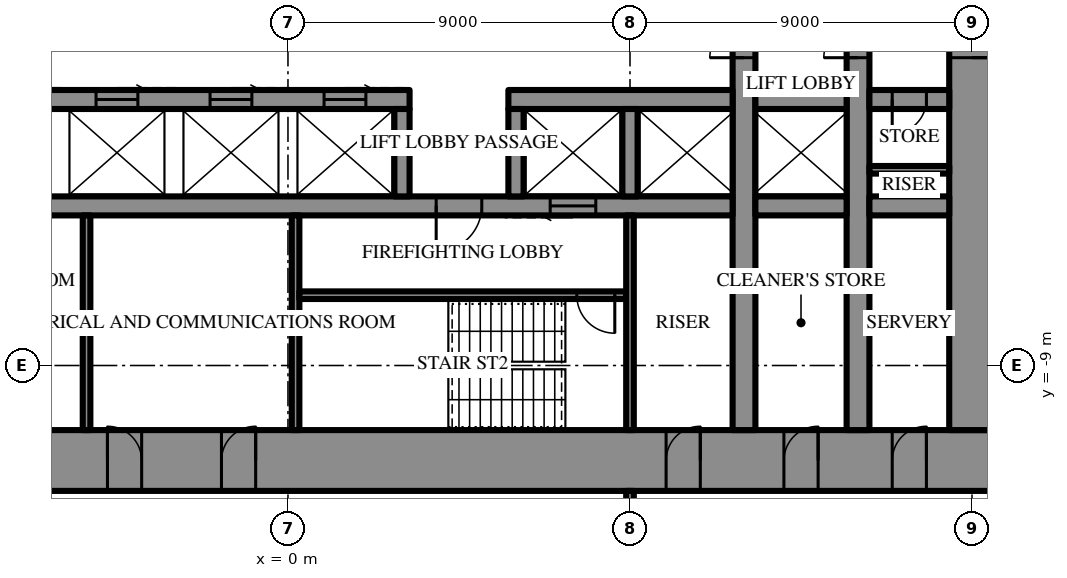
"""IFC4 building model, lengths in metres.
Left out: names, types, materials, properties, quantities, classifications, styles, units other than length and angle.
Written with IfcOpenShell. Run it as: python <this file> out.ifc"""

import sys

from ifc_helpers import new_model, si_unit, direction, frame, frame_2d, origin, place, context, subcontext, project, spatial, rectangle, extrude, element, fill, save


model = new_model("IFC4")
c1 = context("Model", 3, precision=1e-05, world=origin(), true_north=direction((0.0, 1.0)))
c2 = subcontext(c1, "Body", "Model", "MODEL_VIEW")
j1 = project(units=[si_unit("LENGTHUNIT", "METRE"), si_unit("PLANEANGLEUNIT", "RADIAN")], contexts=[c1])
p1 = place(None, origin())
s1 = spatial("IfcSite", under=j1, at=p1, CompositionType="ELEMENT")
p2 = place(p1, origin())
s2 = spatial("IfcBuilding", under=s1, at=p2, CompositionType="ELEMENT")
p3 = place(p2, frame((0.0, 0.0, 165.7)))
s3 = spatial("IfcBuildingStorey", under=s2, at=p3, CompositionType="ELEMENT", Elevation=165.7)
p4 = place(p3, frame((18.6, -11.5, 0.0), z_axis=(0.0, 0.0, 1.0), x_axis=(-1.0, 0.0, 0.0)))
e1 = element("IfcWall", 1, at=p4, inside=s3, PredefinedType="SHEAR", context=c2, shape_type="SweptSolid", body=[
    extrude(rectangle(XDim=37.2, YDim=1.6, at=frame_2d((18.6, 0.0))), origin(), (0.0, 0.0, 1.0), 4.2),
])
p5 = place(p4, frame((19.45, 0.0, 0.0)))
e2 = element("IfcOpeningElement", 2, at=p5, cuts=e1, PredefinedType="OPENING", context=c2, shape_type="SweptSolid", body=[
    extrude(rectangle(XDim=0.9, YDim=2.2, at=frame_2d((0.45, 1.1))), frame((0.0, 0.81, 0.0), z_axis=(0.0, -1.0, 0.0), x_axis=(1.0, 0.0, 0.0)), (0.0, 0.0, 1.0), 1.62),
])
p6 = place(p4, frame((22.45, 0.0, 0.0)))
e3 = element("IfcOpeningElement", 3, at=p6, cuts=e1, PredefinedType="OPENING", context=c2, shape_type="SweptSolid", body=[
    extrude(rectangle(XDim=0.9, YDim=2.2, at=frame_2d((0.45, 1.1))), frame((0.0, 0.81, 0.0), z_axis=(0.0, -1.0, 0.0), x_axis=(1.0, 0.0, 0.0)), (0.0, 0.0, 1.0), 1.62),
])
p7 = place(p4, frame((25.5, 0.0, 0.0)))
e4 = element("IfcOpeningElement", 4, at=p7, cuts=e1, PredefinedType="OPENING", context=c2, shape_type="SweptSolid", body=[
    extrude(rectangle(XDim=1.0, YDim=2.2, at=frame_2d((0.5, 1.1))), frame((0.0, 0.81, 0.0), z_axis=(0.0, -1.0, 0.0), x_axis=(1.0, 0.0, 0.0)), (0.0, 0.0, 1.0), 1.62),
])
p8 = place(p4, frame((1.8, 0.0, 0.0)))
e5 = element("IfcOpeningElement", 5, at=p8, cuts=e1, PredefinedType="OPENING", context=c2, shape_type="SweptSolid", body=[
    extrude(rectangle(XDim=0.9, YDim=2.2, at=frame_2d((0.45, 1.1))), frame((0.0, 0.81, 0.0), z_axis=(0.0, -1.0, 0.0), x_axis=(1.0, 0.0, 0.0)), (0.0, 0.0, 1.0), 1.62),
])
p9 = place(p4, frame((4.65, 0.0, 0.0)))
e6 = element("IfcOpeningElement", 6, at=p9, cuts=e1, PredefinedType="OPENING", context=c2, shape_type="SweptSolid", body=[
    extrude(rectangle(XDim=0.9, YDim=2.2, at=frame_2d((0.45, 1.1))), frame((0.0, 0.81, 0.0), z_axis=(0.0, -1.0, 0.0), x_axis=(1.0, 0.0, 0.0)), (0.0, 0.0, 1.0), 1.62),
])
p10 = place(p4, frame((7.75, 0.0, 0.0)))
e7 = element("IfcOpeningElement", 7, at=p10, cuts=e1, PredefinedType="OPENING", context=c2, shape_type="SweptSolid", body=[
    extrude(rectangle(XDim=0.9, YDim=2.2, at=frame_2d((0.45, 1.1))), frame((0.0, 0.81, 0.0), z_axis=(0.0, -1.0, 0.0), x_axis=(1.0, 0.0, 0.0)), (0.0, 0.0, 1.0), 1.62),
])
p11 = place(p4, frame((28.55, 0.0, 0.0)))
e8 = element("IfcOpeningElement", 8, at=p11, cuts=e1, PredefinedType="OPENING", context=c2, shape_type="SweptSolid", body=[
    extrude(rectangle(XDim=0.9, YDim=2.2, at=frame_2d((0.45, 1.1))), frame((0.0, 0.81, 0.0), z_axis=(0.0, -1.0, 0.0), x_axis=(1.0, 0.0, 0.0)), (0.0, 0.0, 1.0), 1.62),
])
p12 = place(p4, frame((31.65, 0.0, 0.0)))
e9 = element("IfcOpeningElement", 9, at=p12, cuts=e1, PredefinedType="OPENING", context=c2, shape_type="SweptSolid", body=[
    extrude(rectangle(XDim=0.9, YDim=2.2, at=frame_2d((0.45, 1.1))), frame((0.0, 0.81, 0.0), z_axis=(0.0, -1.0, 0.0), x_axis=(1.0, 0.0, 0.0)), (0.0, 0.0, 1.0), 1.62),
])
p13 = place(p4, frame((34.5, 0.0, 0.0)))
e10 = element("IfcOpeningElement", 10, at=p13, cuts=e1, PredefinedType="OPENING", context=c2, shape_type="SweptSolid", body=[
    extrude(rectangle(XDim=0.9, YDim=2.2, at=frame_2d((0.45, 1.1))), frame((0.0, 0.81, 0.0), z_axis=(0.0, -1.0, 0.0), x_axis=(1.0, 0.0, 0.0)), (0.0, 0.0, 1.0), 1.62),
])
p14 = place(p3, frame((18.0, -10.7, 0.0), z_axis=(0.0, 0.0, 1.0), x_axis=(0.0, 1.0, 0.0)))
e11 = element("IfcWall", 11, at=p14, inside=s3, PredefinedType="SHEAR", context=c2, shape_type="SweptSolid", body=[
    extrude(rectangle(XDim=21.4, YDim=1.2, at=frame_2d((10.7, 0.0))), origin(), (0.0, 0.0, 1.0), 4.2),
])
p15 = place(p14, frame((9.8, 0.0, 0.0)))
e12 = element("IfcOpeningElement", 12, at=p15, cuts=e11, PredefinedType="OPENING", context=c2, shape_type="SweptSolid", body=[
    extrude(rectangle(XDim=1.8, YDim=2.4, at=frame_2d((0.9, 1.2))), frame((0.0, 0.61, 0.0), z_axis=(0.0, -1.0, 0.0), x_axis=(1.0, 0.0, 0.0)), (0.0, 0.0, 1.0), 1.22),
])
p16 = place(p3, frame((12.0, -10.7, 0.0), z_axis=(0.0, 0.0, 1.0), x_axis=(0.0, 1.0, 0.0)))
e13 = element("IfcWall", 13, at=p16, inside=s3, PredefinedType="SHEAR", context=c2, shape_type="SweptSolid", body=[
    extrude(rectangle(XDim=21.4, YDim=0.6, at=frame_2d((10.7, 0.0))), origin(), (0.0, 0.0, 1.0), 4.2),
])
p17 = place(p16, frame((9.8, 0.0, 0.0)))
e14 = element("IfcOpeningElement", 14, at=p17, cuts=e13, PredefinedType="OPENING", context=c2, shape_type="SweptSolid", body=[
    extrude(rectangle(XDim=1.8, YDim=2.4, at=frame_2d((0.9, 1.2))), frame((0.0, 0.31, 0.0), z_axis=(0.0, -1.0, 0.0), x_axis=(1.0, 0.0, 0.0)), (0.0, 0.0, 1.0), 0.62),
])
p18 = place(p3, frame((15.0, -10.7, 0.0), z_axis=(0.0, 0.0, 1.0), x_axis=(0.0, 1.0, 0.0)))
e15 = element("IfcWall", 15, at=p18, inside=s3, PredefinedType="SHEAR", context=c2, shape_type="SweptSolid", body=[
    extrude(rectangle(XDim=21.4, YDim=0.6, at=frame_2d((10.7, 0.0))), origin(), (0.0, 0.0, 1.0), 4.2),
])
p19 = place(p18, frame((9.8, 0.0, 0.0)))
e16 = element("IfcOpeningElement", 16, at=p19, cuts=e15, PredefinedType="OPENING", context=c2, shape_type="SweptSolid", body=[
    extrude(rectangle(XDim=1.8, YDim=2.4, at=frame_2d((0.9, 1.2))), frame((0.0, 0.31, 0.0), z_axis=(0.0, -1.0, 0.0), x_axis=(1.0, 0.0, 0.0)), (0.0, 0.0, 1.0), 0.62),
])
p20 = place(p3, frame((17.4, -2.0, 0.0), z_axis=(0.0, 0.0, 1.0), x_axis=(-1.0, 0.0, 0.0)))
e17 = element("IfcWall", 17, at=p20, inside=s3, PredefinedType="SHEAR", context=c2, shape_type="SweptSolid", body=[
    extrude(rectangle(XDim=2.1, YDim=0.5, at=frame_2d((1.05, 0.0))), origin(), (0.0, 0.0, 1.0), 4.2),
])
p21 = place(p20, frame((0.6, 0.0, 0.0)))
e18 = element("IfcOpeningElement", 18, at=p21, cuts=e17, PredefinedType="OPENING", context=c2, shape_type="SweptSolid", body=[
    extrude(rectangle(XDim=0.9, YDim=2.2, at=frame_2d((0.45, 1.1))), frame((0.0, 0.26, 0.0), z_axis=(0.0, -1.0, 0.0), x_axis=(1.0, 0.0, 0.0)), (0.0, 0.0, 1.0), 0.52),
])
p22 = place(p3, frame((14.7, -2.0, 0.0), z_axis=(0.0, 0.0, 1.0), x_axis=(-1.0, 0.0, 0.0)))
e19 = element("IfcWall", 19, at=p22, inside=s3, PredefinedType="SHEAR", context=c2, shape_type="SweptSolid", body=[
    extrude(rectangle(XDim=2.4, YDim=0.5, at=frame_2d((1.2, 0.0))), origin(), (0.0, 0.0, 1.0), 4.2),
])
p23 = place(p3, frame((11.7, -2.0, 0.0), z_axis=(0.0, 0.0, 1.0), x_axis=(-1.0, 0.0, 0.0)))
e20 = element("IfcWall", 20, at=p23, inside=s3, PredefinedType="SHEAR", context=c2, shape_type="SweptSolid", body=[
    extrude(rectangle(XDim=5.9, YDim=0.5, at=frame_2d((2.95, 0.0))), origin(), (0.0, 0.0, 1.0), 4.2),
])
p24 = place(p3, frame((3.2, -2.0, 0.0), z_axis=(0.0, 0.0, 1.0), x_axis=(-1.0, 0.0, 0.0)))
e21 = element("IfcWall", 21, at=p24, inside=s3, PredefinedType="SHEAR", context=c2, shape_type="SweptSolid", body=[
    extrude(rectangle(XDim=14.9, YDim=0.5, at=frame_2d((7.45, 0.0))), origin(), (0.0, 0.0, 1.0), 4.2),
])
p25 = place(p24, frame((1.15, 0.0, 0.0)))
e22 = element("IfcOpeningElement", 22, at=p25, cuts=e21, PredefinedType="OPENING", context=c2, shape_type="SweptSolid", body=[
    extrude(rectangle(XDim=1.1, YDim=2.2, at=frame_2d((0.55, 1.1))), frame((0.0, 0.26, 0.0), z_axis=(0.0, -1.0, 0.0), x_axis=(1.0, 0.0, 0.0)), (0.0, 0.0, 1.0), 0.52),
])
p26 = place(p24, frame((4.15, 0.0, 0.0)))
e23 = element("IfcOpeningElement", 23, at=p26, cuts=e21, PredefinedType="OPENING", context=c2, shape_type="SweptSolid", body=[
    extrude(rectangle(XDim=1.1, YDim=2.2, at=frame_2d((0.55, 1.1))), frame((0.0, 0.26, 0.0), z_axis=(0.0, -1.0, 0.0), x_axis=(1.0, 0.0, 0.0)), (0.0, 0.0, 1.0), 0.52),
])
p27 = place(p24, frame((7.15, 0.0, 0.0)))
e24 = element("IfcOpeningElement", 24, at=p27, cuts=e21, PredefinedType="OPENING", context=c2, shape_type="SweptSolid", body=[
    extrude(rectangle(XDim=1.1, YDim=2.2, at=frame_2d((0.55, 1.1))), frame((0.0, 0.26, 0.0), z_axis=(0.0, -1.0, 0.0), x_axis=(1.0, 0.0, 0.0)), (0.0, 0.0, 1.0), 0.52),
])
p28 = place(p24, frame((10.15, 0.0, 0.0)))
e25 = element("IfcOpeningElement", 25, at=p28, cuts=e21, PredefinedType="OPENING", context=c2, shape_type="SweptSolid", body=[
    extrude(rectangle(XDim=1.1, YDim=2.2, at=frame_2d((0.55, 1.1))), frame((0.0, 0.26, 0.0), z_axis=(0.0, -1.0, 0.0), x_axis=(1.0, 0.0, 0.0)), (0.0, 0.0, 1.0), 0.52),
])
p29 = place(p3, frame((17.4, -4.8, 0.0), z_axis=(0.0, 0.0, 1.0), x_axis=(-1.0, 0.0, 0.0)))
e26 = element("IfcWall", 26, at=p29, inside=s3, PredefinedType="SHEAR", context=c2, shape_type="SweptSolid", body=[
    extrude(rectangle(XDim=2.1, YDim=0.5, at=frame_2d((1.05, 0.0))), origin(), (0.0, 0.0, 1.0), 4.2),
])
p30 = place(p3, frame((14.7, -4.8, 0.0), z_axis=(0.0, 0.0, 1.0), x_axis=(-1.0, 0.0, 0.0)))
e27 = element("IfcWall", 27, at=p30, inside=s3, PredefinedType="SHEAR", context=c2, shape_type="SweptSolid", body=[
    extrude(rectangle(XDim=2.4, YDim=0.5, at=frame_2d((1.2, 0.0))), origin(), (0.0, 0.0, 1.0), 4.2),
])
p31 = place(p3, frame((11.7, -4.8, 0.0), z_axis=(0.0, 0.0, 1.0), x_axis=(-1.0, 0.0, 0.0)))
e28 = element("IfcWall", 28, at=p31, inside=s3, PredefinedType="SHEAR", context=c2, shape_type="SweptSolid", body=[
    extrude(rectangle(XDim=23.4, YDim=0.5, at=frame_2d((11.7, 0.0))), origin(), (0.0, 0.0, 1.0), 4.2),
])
p32 = place(p31, frame((6.6, 0.0, 0.0)))
e29 = element("IfcOpeningElement", 29, at=p32, cuts=e28, PredefinedType="OPENING", context=c2, shape_type="SweptSolid", body=[
    extrude(rectangle(XDim=1.2, YDim=2.2, at=frame_2d((0.6, 1.1))), frame((0.0, 0.26, 0.0), z_axis=(0.0, -1.0, 0.0), x_axis=(1.0, 0.0, 0.0)), (0.0, 0.0, 1.0), 0.52),
])
p33 = place(p31, frame((3.6, 0.0, 0.0)))
e30 = element("IfcOpeningElement", 30, at=p33, cuts=e28, PredefinedType="OPENING", context=c2, shape_type="SweptSolid", body=[
    extrude(rectangle(XDim=1.2, YDim=2.2, at=frame_2d((0.6, 1.1))), frame((0.0, 0.26, 0.0), z_axis=(0.0, -1.0, 0.0), x_axis=(1.0, 0.0, 0.0)), (0.0, 0.0, 1.0), 0.52),
])
for number, where, z_axis, x_axis in (
    (31, (9.0, -2.25, 0.0), (0.0, 0.0, 1.0), (0.0, -1.0, 0.0)),
    (32, (6.0, -2.25, 0.0), (0.0, 0.0, 1.0), (0.0, -1.0, 0.0)),
    (33, (3.0, -2.25, 0.0), (0.0, 0.0, 1.0), (0.0, -1.0, 0.0)),
):
    element("IfcWall", number, at=place(p3, frame(where, z_axis=z_axis, x_axis=x_axis)), inside=s3, PredefinedType="SHEAR", context=c2, shape_type="SweptSolid", body=[
        extrude(rectangle(XDim=2.3, YDim=0.4, at=frame_2d((1.15, 0.0))), origin(), (0.0, 0.0, 1.0), 4.2),
    ])
p34 = place(p3, frame((0.2, -5.05, 0.0), z_axis=(0.0, 0.0, 1.0), x_axis=(0.0, -1.0, 0.0)))
e34 = element("IfcWall", 34, at=p34, inside=s3, PredefinedType="SHEAR", context=c2, shape_type="SweptSolid", body=[
    extrude(rectangle(XDim=5.65, YDim=0.2, at=frame_2d((2.825, 0.0))), origin(), (0.0, 0.0, 1.0), 4.2),
])
p35 = place(p3, frame((8.9, -7.15, 0.0), z_axis=(0.0, 0.0, 1.0), x_axis=(-1.0, 0.0, 0.0)))
e35 = element("IfcWall", 35, at=p35, inside=s3, PredefinedType="SHEAR", context=c2, shape_type="SweptSolid", body=[
    extrude(rectangle(XDim=8.6, YDim=0.2, at=frame_2d((4.3, 0.0))), origin(), (0.0, 0.0, 1.0), 4.2),
])
p36 = place(p35, frame((0.3, 0.0, 0.0)))
e36 = element("IfcOpeningElement", 36, at=p36, cuts=e35, PredefinedType="OPENING", context=c2, shape_type="SweptSolid", body=[
    extrude(rectangle(XDim=1.0, YDim=2.2, at=frame_2d((0.5, 1.1))), frame((0.0, 0.11, 0.0), z_axis=(0.0, -1.0, 0.0), x_axis=(1.0, 0.0, 0.0)), (0.0, 0.0, 1.0), 0.22),
])
for number, where, z_axis, x_axis in (
    (37, (9.0, -5.05, 0.0), (0.0, 0.0, 1.0), (0.0, -1.0, 0.0)),
    (38, (-5.3, -5.05, 0.0), (0.0, 0.0, 1.0), (0.0, -1.0, 0.0)),
):
    element("IfcWall", number, at=place(p3, frame(where, z_axis=z_axis, x_axis=x_axis)), inside=s3, PredefinedType="PARTITIONING", context=c2, shape_type="SweptSolid", body=[
        extrude(rectangle(XDim=5.65, YDim=0.2, at=frame_2d((2.825, 0.0))), origin(), (0.0, 0.0, 1.0), 4.0),
    ])
p37 = place(p3, frame((17.4, -3.85, 0.0), z_axis=(0.0, 0.0, 1.0), x_axis=(-1.0, 0.0, 0.0)))
e39 = element("IfcWall", 39, at=p37, inside=s3, PredefinedType="PARTITIONING", context=c2, shape_type="SweptSolid", body=[
    extrude(rectangle(XDim=2.1, YDim=0.2, at=frame_2d((1.05, 0.0))), origin(), (0.0, 0.0, 1.0), 4.0),
])
p38 = place(p3, frame((15.298, -20.503, 0.0), z_axis=(0.0, 0.0, 1.0), x_axis=(0.500010972563, 0.86601906868, 0.0)))
e40 = element("IfcWall", 40, at=p38, inside=s3, PredefinedType="PARTITIONING", context=c2, shape_type="SweptSolid", body=[
    extrude(rectangle(XDim=15.211, YDim=0.2, at=frame_2d((7.605, 0.0))), origin(), (0.0, 0.0, 1.0), 4.0),
])
p39 = place(p38, frame((2.102, 0.0, 0.0)))
e41 = element("IfcOpeningElement", 41, at=p39, cuts=e40, PredefinedType="OPENING", context=c2, shape_type="SweptSolid", body=[
    extrude(rectangle(XDim=1.0, YDim=2.2, at=frame_2d((0.5, 1.1))), frame((0.0, 0.11, 0.0), z_axis=(0.0, -1.0, 0.0), x_axis=(1.0, 0.0, 0.0)), (0.0, 0.0, 1.0), 0.22),
])
p40 = place(p3, frame((9.0, -12.3, 0.0), z_axis=(0.0, 0.0, 1.0), x_axis=(0.0, -1.0, 0.0)))
e42 = element("IfcWall", 42, at=p40, inside=s3, PredefinedType="PARTITIONING", context=c2, shape_type="SweptSolid", body=[
    extrude(rectangle(XDim=19.0, YDim=0.2, at=frame_2d((9.5, 0.0))), origin(), (0.0, 0.0, 1.0), 4.0),
])
p41 = place(p40, frame((1.4, 0.0, 0.0)))
e43 = element("IfcOpeningElement", 43, at=p41, cuts=e42, PredefinedType="OPENING", context=c2, shape_type="SweptSolid", body=[
    extrude(rectangle(XDim=1.0, YDim=2.2, at=frame_2d((0.5, 1.1))), frame((0.0, 0.11, 0.0), z_axis=(0.0, -1.0, 0.0), x_axis=(1.0, 0.0, 0.0)), (0.0, 0.0, 1.0), 0.22),
])
p42 = place(p15, frame((1.8, 0.0, 0.0), z_axis=(0.0, 0.0, 1.0), x_axis=(-1.0, 0.0, 0.0)))
e44 = element("IfcDoor", 44, at=p42, inside=s3, OperationType="DOUBLE_DOOR_SINGLE_SWING", PredefinedType="DOOR", context=c2, shape_type="SweptSolid", body=[
    extrude(rectangle(XDim=1.8, YDim=2.4, at=frame_2d((0.9, 1.2))), frame((0.0, 0.025, 0.0), z_axis=(0.0, -1.0, 0.0), x_axis=(1.0, 0.0, 0.0)), (0.0, 0.0, 1.0), 0.05),
])
fill(e12, e44)
p43 = place(p32, origin())
e45 = element("IfcDoor", 45, at=p43, inside=s3, OperationType="SINGLE_SWING_LEFT", PredefinedType="DOOR", context=c2, shape_type="SweptSolid", body=[
    extrude(rectangle(XDim=1.2, YDim=2.2, at=frame_2d((0.6, 1.1))), frame((0.0, 0.025, 0.0), z_axis=(0.0, -1.0, 0.0), x_axis=(1.0, 0.0, 0.0)), (0.0, 0.0, 1.0), 0.05),
])
fill(e29, e45)
p44 = place(p36, origin())
e46 = element("IfcDoor", 46, at=p44, inside=s3, OperationType="SINGLE_SWING_RIGHT", PredefinedType="DOOR", context=c2, shape_type="SweptSolid", body=[
    extrude(rectangle(XDim=1.0, YDim=2.2, at=frame_2d((0.5, 1.1))), frame((0.0, 0.025, 0.0), z_axis=(0.0, -1.0, 0.0), x_axis=(1.0, 0.0, 0.0)), (0.0, 0.0, 1.0), 0.05),
])
fill(e36, e46)
p45 = place(p5, frame((0.9, 0.0, 0.0), z_axis=(0.0, 0.0, 1.0), x_axis=(-1.0, 0.0, 0.0)))
e47 = element("IfcDoor", 47, at=p45, inside=s3, OperationType="SINGLE_SWING_LEFT", PredefinedType="DOOR", context=c2, shape_type="SweptSolid", body=[
    extrude(rectangle(XDim=0.9, YDim=2.2, at=frame_2d((0.45, 1.1))), frame((0.0, 0.025, 0.0), z_axis=(0.0, -1.0, 0.0), x_axis=(1.0, 0.0, 0.0)), (0.0, 0.0, 1.0), 0.05),
])
fill(e2, e47)
p46 = place(p6, frame((0.9, 0.0, 0.0), z_axis=(0.0, 0.0, 1.0), x_axis=(-1.0, 0.0, 0.0)))
e48 = element("IfcDoor", 48, at=p46, inside=s3, OperationType="SINGLE_SWING_RIGHT", PredefinedType="DOOR", context=c2, shape_type="SweptSolid", body=[
    extrude(rectangle(XDim=0.9, YDim=2.2, at=frame_2d((0.45, 1.1))), frame((0.0, 0.025, 0.0), z_axis=(0.0, -1.0, 0.0), x_axis=(1.0, 0.0, 0.0)), (0.0, 0.0, 1.0), 0.05),
])
fill(e3, e48)
p47 = place(p8, frame((0.9, 0.0, 0.0), z_axis=(0.0, 0.0, 1.0), x_axis=(-1.0, 0.0, 0.0)))
e49 = element("IfcDoor", 49, at=p47, inside=s3, OperationType="SINGLE_SWING_LEFT", PredefinedType="DOOR", context=c2, shape_type="SweptSolid", body=[
    extrude(rectangle(XDim=0.9, YDim=2.2, at=frame_2d((0.45, 1.1))), frame((0.0, 0.025, 0.0), z_axis=(0.0, -1.0, 0.0), x_axis=(1.0, 0.0, 0.0)), (0.0, 0.0, 1.0), 0.05),
])
fill(e5, e49)
p48 = place(p9, frame((0.9, 0.0, 0.0), z_axis=(0.0, 0.0, 1.0), x_axis=(-1.0, 0.0, 0.0)))
e50 = element("IfcDoor", 50, at=p48, inside=s3, OperationType="SINGLE_SWING_LEFT", PredefinedType="DOOR", context=c2, shape_type="SweptSolid", body=[
    extrude(rectangle(XDim=0.9, YDim=2.2, at=frame_2d((0.45, 1.1))), frame((0.0, 0.025, 0.0), z_axis=(0.0, -1.0, 0.0), x_axis=(1.0, 0.0, 0.0)), (0.0, 0.0, 1.0), 0.05),
])
fill(e6, e50)
p49 = place(p10, frame((0.9, 0.0, 0.0), z_axis=(0.0, 0.0, 1.0), x_axis=(-1.0, 0.0, 0.0)))
e51 = element("IfcDoor", 51, at=p49, inside=s3, OperationType="SINGLE_SWING_LEFT", PredefinedType="DOOR", context=c2, shape_type="SweptSolid", body=[
    extrude(rectangle(XDim=0.9, YDim=2.2, at=frame_2d((0.45, 1.1))), frame((0.0, 0.025, 0.0), z_axis=(0.0, -1.0, 0.0), x_axis=(1.0, 0.0, 0.0)), (0.0, 0.0, 1.0), 0.05),
])
fill(e7, e51)
p50 = place(p21, origin())
e52 = element("IfcDoor", 52, at=p50, inside=s3, OperationType="SINGLE_SWING_LEFT", PredefinedType="DOOR", context=c2, shape_type="SweptSolid", body=[
    extrude(rectangle(XDim=0.9, YDim=2.2, at=frame_2d((0.45, 1.1))), frame((0.0, 0.025, 0.0), z_axis=(0.0, -1.0, 0.0), x_axis=(1.0, 0.0, 0.0)), (0.0, 0.0, 1.0), 0.05),
])
fill(e18, e52)
p51 = place(p17, origin())
e53 = element("IfcDoor", 53, at=p51, inside=s3, OperationType="DOUBLE_DOOR_SINGLE_SWING", PredefinedType="DOOR", context=c2, shape_type="SweptSolid", body=[
    extrude(rectangle(XDim=1.8, YDim=2.4, at=frame_2d((0.9, 1.2))), frame((0.0, 0.025, 0.0), z_axis=(0.0, -1.0, 0.0), x_axis=(1.0, 0.0, 0.0)), (0.0, 0.0, 1.0), 0.05),
])
fill(e14, e53)
p52 = place(p19, origin())
e54 = element("IfcDoor", 54, at=p52, inside=s3, OperationType="DOUBLE_DOOR_SINGLE_SWING", PredefinedType="DOOR", context=c2, shape_type="SweptSolid", body=[
    extrude(rectangle(XDim=1.8, YDim=2.4, at=frame_2d((0.9, 1.2))), frame((0.0, 0.025, 0.0), z_axis=(0.0, -1.0, 0.0), x_axis=(1.0, 0.0, 0.0)), (0.0, 0.0, 1.0), 0.05),
])
fill(e16, e54)
p53 = place(p33, origin())
e55 = element("IfcDoor", 55, at=p53, inside=s3, OperationType="SLIDING_TO_LEFT", PredefinedType="DOOR", context=c2, shape_type="SweptSolid", body=[
    extrude(rectangle(XDim=1.2, YDim=2.2, at=frame_2d((0.6, 1.1))), frame((0.0, 0.025, 0.0), z_axis=(0.0, -1.0, 0.0), x_axis=(1.0, 0.0, 0.0)), (0.0, 0.0, 1.0), 0.05),
])
fill(e30, e55)
p54 = place(p25, frame((1.1, 0.0, 0.0), z_axis=(0.0, 0.0, 1.0), x_axis=(-1.0, 0.0, 0.0)))
e56 = element("IfcDoor", 56, at=p54, inside=s3, OperationType="SLIDING_TO_LEFT", PredefinedType="DOOR", context=c2, shape_type="SweptSolid", body=[
    extrude(rectangle(XDim=1.1, YDim=2.2, at=frame_2d((0.55, 1.1))), frame((0.0, 0.025, 0.0), z_axis=(0.0, -1.0, 0.0), x_axis=(1.0, 0.0, 0.0)), (0.0, 0.0, 1.0), 0.05),
])
fill(e22, e56)
p55 = place(p26, frame((1.1, 0.0, 0.0), z_axis=(0.0, 0.0, 1.0), x_axis=(-1.0, 0.0, 0.0)))
e57 = element("IfcDoor", 57, at=p55, inside=s3, OperationType="SLIDING_TO_LEFT", PredefinedType="DOOR", context=c2, shape_type="SweptSolid", body=[
    extrude(rectangle(XDim=1.1, YDim=2.2, at=frame_2d((0.55, 1.1))), frame((0.0, 0.025, 0.0), z_axis=(0.0, -1.0, 0.0), x_axis=(1.0, 0.0, 0.0)), (0.0, 0.0, 1.0), 0.05),
])
fill(e23, e57)
p56 = place(p27, frame((1.1, 0.0, 0.0), z_axis=(0.0, 0.0, 1.0), x_axis=(-1.0, 0.0, 0.0)))
e58 = element("IfcDoor", 58, at=p56, inside=s3, OperationType="SLIDING_TO_LEFT", PredefinedType="DOOR", context=c2, shape_type="SweptSolid", body=[
    extrude(rectangle(XDim=1.1, YDim=2.2, at=frame_2d((0.55, 1.1))), frame((0.0, 0.025, 0.0), z_axis=(0.0, -1.0, 0.0), x_axis=(1.0, 0.0, 0.0)), (0.0, 0.0, 1.0), 0.05),
])
fill(e24, e58)
save(model, sys.argv[1])
